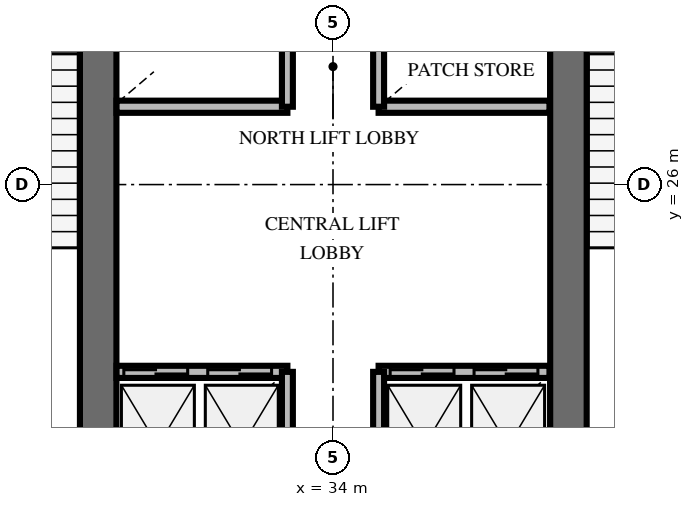
"""IFC4 building model, lengths in metres.
Left out: names, types, materials, properties, quantities, classifications, styles, units other than length and angle.
Written with IfcOpenShell. Run it as: python <this file> out.ifc"""

import sys

from ifc_helpers import new_model, si_unit, direction, frame, frame_2d, origin, place, context, subcontext, project, spatial, rectangle, extrude, element, fill, save


model = new_model("IFC4")
c1 = context("Model", 3, precision=1e-05, world=origin(), true_north=direction((0.0, 1.0)))
c2 = subcontext(c1, "Body", "Model", "MODEL_VIEW")
j1 = project(units=[si_unit("LENGTHUNIT", "METRE"), si_unit("PLANEANGLEUNIT", "RADIAN")], contexts=[c1])
p1 = place(None, origin())
s1 = spatial("IfcSite", under=j1, at=p1, CompositionType="ELEMENT")
p2 = place(p1, origin())
s2 = spatial("IfcBuilding", under=s1, at=p2, CompositionType="ELEMENT")
p3 = place(p2, frame((0.0, 0.0, 46.8)))
s3 = spatial("IfcBuildingStorey", under=s2, at=p3, CompositionType="ELEMENT", Elevation=46.8)
for number, where, z_axis, x_axis in (
    (1, (30.138, 20.112, 0.0), (0.0, 0.0, 1.0), (0.0, 1.0, 0.0)),
    (2, (37.872, 20.112, 0.0), (0.0, 0.0, 1.0), (0.0, 1.0, 0.0)),
):
    element("IfcWall", number, at=place(p3, frame(where, z_axis=z_axis, x_axis=x_axis)), inside=s3, PredefinedType="SHEAR", context=c2, shape_type="SweptSolid", body=[
        extrude(rectangle(XDim=9.976, YDim=0.6, at=frame_2d((4.988, 0.0))), origin(), (0.0, 0.0, 1.0), 4.2),
    ])
p4 = place(p3, frame((30.44, 22.92, 0.0), z_axis=(0.0, 0.0, 1.0), x_axis=(1.0, 0.0, 0.0)))
e3 = element("IfcWall", 3, at=p4, inside=s3, PredefinedType="SOLIDWALL", context=c2, shape_type="SweptSolid", body=[
    extrude(rectangle(XDim=2.81, YDim=0.2, at=frame_2d((1.405, 0.0))), origin(), (0.0, 0.0, 1.0), 3.0),
])
p5 = place(p4, frame((0.12, 0.0, 0.0)))
e4 = element("IfcOpeningElement", 4, at=p5, cuts=e3, PredefinedType="OPENING", context=c2, shape_type="SweptSolid", body=[
    extrude(rectangle(XDim=1.05, YDim=2.1, at=frame_2d((0.525, 1.05))), frame((0.0, 0.11, 0.0), z_axis=(0.0, -1.0, 0.0), x_axis=(1.0, 0.0, 0.0)), (0.0, 0.0, 1.0), 0.22),
])
p6 = place(p4, frame((1.5, 0.0, 0.0)))
e5 = element("IfcOpeningElement", 5, at=p6, cuts=e3, PredefinedType="OPENING", context=c2, shape_type="SweptSolid", body=[
    extrude(rectangle(XDim=1.05, YDim=2.1, at=frame_2d((0.525, 1.05))), frame((0.0, 0.11, 0.0), z_axis=(0.0, -1.0, 0.0), x_axis=(1.0, 0.0, 0.0)), (0.0, 0.0, 1.0), 0.22),
])
p7 = place(p3, frame((33.25, 20.5, 0.0), z_axis=(0.0, 0.0, 1.0), x_axis=(0.0, 1.0, 0.0)))
e6 = element("IfcWall", 6, at=p7, inside=s3, PredefinedType="SOLIDWALL", context=c2, shape_type="SweptSolid", body=[
    extrude(rectangle(XDim=2.42, YDim=0.18, at=frame_2d((1.21, 0.0))), origin(), (0.0, 0.0, 1.0), 3.0),
])
p8 = place(p3, frame((34.75, 22.92, 0.0), z_axis=(0.0, 0.0, 1.0), x_axis=(1.0, 0.0, 0.0)))
e7 = element("IfcWall", 7, at=p8, inside=s3, PredefinedType="SOLIDWALL", context=c2, shape_type="SweptSolid", body=[
    extrude(rectangle(XDim=2.81, YDim=0.2, at=frame_2d((1.405, 0.0))), origin(), (0.0, 0.0, 1.0), 3.0),
])
p9 = place(p8, frame((0.19, 0.0, 0.0)))
e8 = element("IfcOpeningElement", 8, at=p9, cuts=e7, PredefinedType="OPENING", context=c2, shape_type="SweptSolid", body=[
    extrude(rectangle(XDim=1.05, YDim=2.1, at=frame_2d((0.525, 1.05))), frame((0.0, 0.11, 0.0), z_axis=(0.0, -1.0, 0.0), x_axis=(1.0, 0.0, 0.0)), (0.0, 0.0, 1.0), 0.22),
])
p10 = place(p8, frame((1.57, 0.0, 0.0)))
e9 = element("IfcOpeningElement", 9, at=p10, cuts=e7, PredefinedType="OPENING", context=c2, shape_type="SweptSolid", body=[
    extrude(rectangle(XDim=1.05, YDim=2.1, at=frame_2d((0.525, 1.05))), frame((0.0, 0.11, 0.0), z_axis=(0.0, -1.0, 0.0), x_axis=(1.0, 0.0, 0.0)), (0.0, 0.0, 1.0), 0.22),
])
p11 = place(p3, frame((34.75, 20.5, 0.0), z_axis=(0.0, 0.0, 1.0), x_axis=(0.0, 1.0, 0.0)))
e10 = element("IfcWall", 10, at=p11, inside=s3, PredefinedType="SOLIDWALL", context=c2, shape_type="SweptSolid", body=[
    extrude(rectangle(XDim=2.42, YDim=0.18, at=frame_2d((1.21, 0.0))), origin(), (0.0, 0.0, 1.0), 3.0),
])
p12 = place(p3, frame((30.44, 27.28, 0.0), z_axis=(0.0, 0.0, 1.0), x_axis=(1.0, 0.0, 0.0)))
e11 = element("IfcWall", 11, at=p12, inside=s3, PredefinedType="SOLIDWALL", context=c2, shape_type="SweptSolid", body=[
    extrude(rectangle(XDim=2.81, YDim=0.2, at=frame_2d((1.405, 0.0))), origin(), (0.0, 0.0, 1.0), 3.0),
])
p13 = place(p3, frame((33.25, 27.28, 0.0), z_axis=(0.0, 0.0, 1.0), x_axis=(0.0, 1.0, 0.0)))
e12 = element("IfcWall", 12, at=p13, inside=s3, PredefinedType="SOLIDWALL", context=c2, shape_type="SweptSolid", body=[
    extrude(rectangle(XDim=2.47, YDim=0.18, at=frame_2d((1.235, 0.0))), origin(), (0.0, 0.0, 1.0), 3.0),
])
p14 = place(p3, frame((34.75, 27.28, 0.0), z_axis=(0.0, 0.0, 1.0), x_axis=(1.0, 0.0, 0.0)))
e13 = element("IfcWall", 13, at=p14, inside=s3, PredefinedType="SOLIDWALL", context=c2, shape_type="SweptSolid", body=[
    extrude(rectangle(XDim=2.81, YDim=0.2, at=frame_2d((1.405, 0.0))), origin(), (0.0, 0.0, 1.0), 3.0),
])
p15 = place(p3, frame((34.75, 27.28, 0.0), z_axis=(0.0, 0.0, 1.0), x_axis=(0.0, 1.0, 0.0)))
e14 = element("IfcWall", 14, at=p15, inside=s3, PredefinedType="SOLIDWALL", context=c2, shape_type="SweptSolid", body=[
    extrude(rectangle(XDim=2.47, YDim=0.18, at=frame_2d((1.235, 0.0))), origin(), (0.0, 0.0, 1.0), 3.0),
])
p16 = place(p5, origin())
e15 = element("IfcDoor", 15, at=p16, inside=s3, OperationType="DOUBLE_DOOR_SLIDING", PredefinedType="USERDEFINED", context=c2, shape_type="SweptSolid", body=[
    extrude(rectangle(XDim=1.05, YDim=2.1, at=frame_2d((0.525, 1.05))), frame((0.0, 0.025, 0.0), z_axis=(0.0, -1.0, 0.0), x_axis=(1.0, 0.0, 0.0)), (0.0, 0.0, 1.0), 0.05),
])
fill(e4, e15)
p17 = place(p6, origin())
e16 = element("IfcDoor", 16, at=p17, inside=s3, OperationType="DOUBLE_DOOR_SLIDING", PredefinedType="USERDEFINED", context=c2, shape_type="SweptSolid", body=[
    extrude(rectangle(XDim=1.05, YDim=2.1, at=frame_2d((0.525, 1.05))), frame((0.0, 0.025, 0.0), z_axis=(0.0, -1.0, 0.0), x_axis=(1.0, 0.0, 0.0)), (0.0, 0.0, 1.0), 0.05),
])
fill(e5, e16)
p18 = place(p9, origin())
e17 = element("IfcDoor", 17, at=p18, inside=s3, OperationType="DOUBLE_DOOR_SLIDING", PredefinedType="USERDEFINED", context=c2, shape_type="SweptSolid", body=[
    extrude(rectangle(XDim=1.05, YDim=2.1, at=frame_2d((0.525, 1.05))), frame((0.0, 0.025, 0.0), z_axis=(0.0, -1.0, 0.0), x_axis=(1.0, 0.0, 0.0)), (0.0, 0.0, 1.0), 0.05),
])
fill(e8, e17)
p19 = place(p10, origin())
e18 = element("IfcDoor", 18, at=p19, inside=s3, OperationType="DOUBLE_DOOR_SLIDING", PredefinedType="USERDEFINED", context=c2, shape_type="SweptSolid", body=[
    extrude(rectangle(XDim=1.05, YDim=2.1, at=frame_2d((0.525, 1.05))), frame((0.0, 0.025, 0.0), z_axis=(0.0, -1.0, 0.0), x_axis=(1.0, 0.0, 0.0)), (0.0, 0.0, 1.0), 0.05),
])
fill(e9, e18)
save(model, sys.argv[1])
